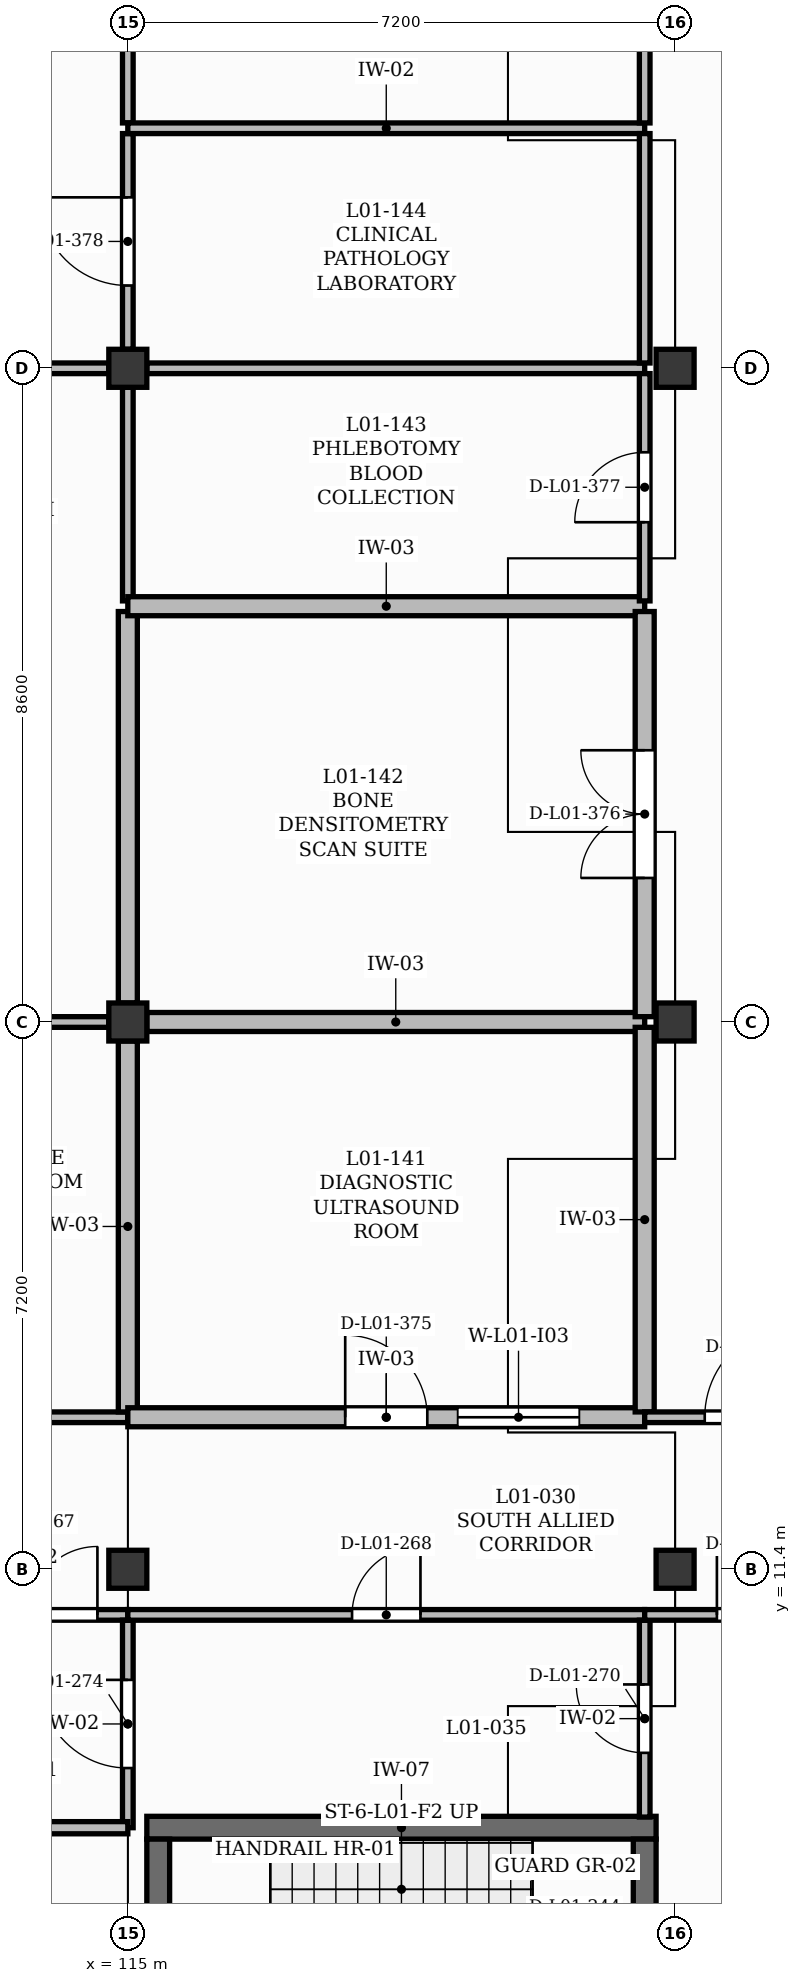
"""IFC4 building model, lengths in metres.
Left out: names, types, materials, properties, quantities, classifications, styles, units other than length and angle.
Written with IfcOpenShell. Run it as: python <this file> out.ifc"""

import sys

from ifc_helpers import new_model, si_unit, direction, frame, frame_2d, origin, origin_2d, place, context, subcontext, project, spatial, rectangle, extrude, element, fill, save


model = new_model("IFC4")
c1 = context("Model", 3, precision=1e-05, world=origin(), true_north=direction((0.0, 1.0)))
c2 = subcontext(c1, "Body", "Model", "MODEL_VIEW")
j1 = project(units=[si_unit("LENGTHUNIT", "METRE"), si_unit("PLANEANGLEUNIT", "RADIAN")], contexts=[c1])
p1 = place(None, origin())
s1 = spatial("IfcSite", under=j1, at=p1, CompositionType="ELEMENT")
p2 = place(p1, origin())
s2 = spatial("IfcBuilding", under=s1, at=p2, CompositionType="ELEMENT")
p3 = place(p2, frame((0.0, 0.0, 4.5)))
s3 = spatial("IfcBuildingStorey", under=s2, at=p3, CompositionType="ELEMENT", Elevation=4.5)
for number, where, z_axis, x_axis in (
    (1, (115.0, 11.4, 0.0), (0.0, 0.0, 1.0), (1.0, 0.0, 0.0)),
    (2, (115.0, 18.6, 0.0), (0.0, 0.0, 1.0), (1.0, 0.0, 0.0)),
    (3, (115.0, 27.2, 0.0), (0.0, 0.0, 1.0), (1.0, 0.0, 0.0)),
    (4, (122.2, 11.4, 0.0), (0.0, 0.0, 1.0), (1.0, 0.0, 0.0)),
    (5, (122.2, 18.6, 0.0), (0.0, 0.0, 1.0), (1.0, 0.0, 0.0)),
    (6, (122.2, 27.2, 0.0), (0.0, 0.0, 1.0), (1.0, 0.0, 0.0)),
):
    element("IfcColumn", number, at=place(p3, frame(where, z_axis=z_axis, x_axis=x_axis)), inside=s3, PredefinedType="COLUMN", context=c2, shape_type="SweptSolid", body=[
        extrude(rectangle(XDim=0.5, YDim=0.5, at=origin_2d()), origin(), (0.0, 0.0, 1.0), 4.22),
    ])
p4 = place(p3, frame((115.25, 8.0, 0.0), z_axis=(0.0, 0.0, 1.0), x_axis=(1.0, 0.0, 0.0)))
e7 = element("IfcWall", 7, at=p4, inside=s3, PredefinedType="SHEAR", context=c2, shape_type="SweptSolid", body=[
    extrude(rectangle(XDim=6.7, YDim=0.3, at=frame_2d((3.35, 0.0))), origin(), (0.0, 0.0, 1.0), 4.25),
])
p5 = place(p3, frame((115.4, 4.95, 0.0), z_axis=(0.0, 0.0, 1.0), x_axis=(0.0, 1.0, 0.0)))
e8 = element("IfcWall", 8, at=p5, inside=s3, PredefinedType="SHEAR", context=c2, shape_type="SweptSolid", body=[
    extrude(rectangle(XDim=2.9, YDim=0.3, at=frame_2d((1.45, 0.0))), origin(), (0.0, 0.0, 1.0), 4.25),
])
p6 = place(p3, frame((121.8, 4.95, 0.0), z_axis=(0.0, 0.0, 1.0), x_axis=(0.0, 1.0, 0.0)))
e9 = element("IfcWall", 9, at=p6, inside=s3, PredefinedType="SHEAR", context=c2, shape_type="SweptSolid", body=[
    extrude(rectangle(XDim=2.9, YDim=0.3, at=frame_2d((1.45, 0.0))), origin(), (0.0, 0.0, 1.0), 4.25),
])
p7 = place(p6, frame((0.89, 0.0, 0.0)))
e10 = element("IfcOpeningElement", 10, at=p7, cuts=e9, PredefinedType="OPENING", context=c2, shape_type="SweptSolid", body=[
    extrude(rectangle(XDim=1.12, YDim=2.1, at=frame_2d((0.56, 1.05))), frame((0.0, 0.16, 0.0), z_axis=(0.0, -1.0, 0.0), x_axis=(1.0, 0.0, 0.0)), (0.0, 0.0, 1.0), 0.32),
])
p8 = place(p3, frame((110.6, 13.4, 0.0), z_axis=(0.0, 0.0, 1.0), x_axis=(1.0, 0.0, 0.0)))
e11 = element("IfcWall", 11, at=p8, inside=s3, PredefinedType="PARTITIONING", context=c2, shape_type="SweptSolid", body=[
    extrude(rectangle(XDim=4.4, YDim=0.14, at=frame_2d((2.2, 0.0))), origin(), (0.0, 0.0, 1.0), 4.18),
])
p9 = place(p3, frame((110.6, 18.6, 0.0), z_axis=(0.0, 0.0, 1.0), x_axis=(1.0, 0.0, 0.0)))
e12 = element("IfcWall", 12, at=p9, inside=s3, PredefinedType="PARTITIONING", context=c2, shape_type="SweptSolid", body=[
    extrude(rectangle(XDim=4.15, YDim=0.14, at=frame_2d((2.075, 0.0))), origin(), (0.0, 0.0, 1.0), 3.76),
])
p10 = place(p3, frame((110.6, 27.2, 0.0), z_axis=(0.0, 0.0, 1.0), x_axis=(1.0, 0.0, 0.0)))
e13 = element("IfcWall", 13, at=p10, inside=s3, PredefinedType="PARTITIONING", context=c2, shape_type="SweptSolid", body=[
    extrude(rectangle(XDim=4.15, YDim=0.14, at=frame_2d((2.075, 0.0))), origin(), (0.0, 0.0, 1.0), 3.87),
])
p11 = place(p3, frame((112.4, 10.8, 0.0), z_axis=(0.0, 0.0, 1.0), x_axis=(1.0, 0.0, 0.0)))
e14 = element("IfcWall", 14, at=p11, inside=s3, PredefinedType="PARTITIONING", context=c2, shape_type="SweptSolid", body=[
    extrude(rectangle(XDim=2.6, YDim=0.14, at=frame_2d((1.3, 0.0))), origin(), (0.0, 0.0, 1.0), 4.18),
])
p12 = place(p11, frame((0.4, 0.0, 0.0)))
e15 = element("IfcOpeningElement", 15, at=p12, cuts=e14, PredefinedType="OPENING", context=c2, shape_type="SweptSolid", body=[
    extrude(rectangle(XDim=1.8, YDim=2.3, at=frame_2d((0.9, 1.15))), frame((0.0, 0.08, 0.0), z_axis=(0.0, -1.0, 0.0), x_axis=(1.0, 0.0, 0.0)), (0.0, 0.0, 1.0), 0.16),
])
p13 = place(p3, frame((115.0, 8.0, 0.0), z_axis=(0.0, 0.0, 1.0), x_axis=(0.0, 1.0, 0.0)))
e16 = element("IfcWall", 16, at=p13, inside=s3, PredefinedType="PARTITIONING", context=c2, shape_type="SweptSolid", body=[
    extrude(rectangle(XDim=2.73, YDim=0.14, at=frame_2d((1.365, 0.0))), origin(), (0.0, 0.0, 1.0), 3.52),
])
p14 = place(p13, frame((0.785, 0.0, 0.0)))
e17 = element("IfcOpeningElement", 17, at=p14, cuts=e16, PredefinedType="OPENING", context=c2, shape_type="SweptSolid", body=[
    extrude(rectangle(XDim=1.16, YDim=2.1, at=frame_2d((0.58, 1.05))), frame((0.0, 0.08, 0.0), z_axis=(0.0, -1.0, 0.0), x_axis=(1.0, 0.0, 0.0)), (0.0, 0.0, 1.0), 0.16),
])
p15 = place(p3, frame((115.0, 10.8, 0.0), z_axis=(0.0, 0.0, 1.0), x_axis=(1.0, 0.0, 0.0)))
e18 = element("IfcWall", 18, at=p15, inside=s3, PredefinedType="PARTITIONING", context=c2, shape_type="SweptSolid", body=[
    extrude(rectangle(XDim=6.8, YDim=0.14, at=frame_2d((3.4, 0.0))), origin(), (0.0, 0.0, 1.0), 4.18),
])
p16 = place(p15, frame((2.95, 0.0, 0.0)))
e19 = element("IfcOpeningElement", 19, at=p16, cuts=e18, PredefinedType="OPENING", context=c2, shape_type="SweptSolid", body=[
    extrude(rectangle(XDim=0.9, YDim=2.1, at=frame_2d((0.45, 1.05))), frame((0.0, 0.08, 0.0), z_axis=(0.0, -1.0, 0.0), x_axis=(1.0, 0.0, 0.0)), (0.0, 0.0, 1.0), 0.16),
])
p17 = place(p3, frame((115.0, 13.47, 0.0), z_axis=(0.0, 0.0, 1.0), x_axis=(0.0, 1.0, 0.0)))
e20 = element("IfcWall", 20, at=p17, inside=s3, PredefinedType="SOLIDWALL", context=c2, shape_type="SweptSolid", body=[
    extrude(rectangle(XDim=4.88, YDim=0.25, at=frame_2d((2.44, 0.0))), origin(), (0.0, 0.0, 1.0), 3.52),
])
p18 = place(p3, frame((115.0, 13.4, 0.0), z_axis=(0.0, 0.0, 1.0), x_axis=(1.0, 0.0, 0.0)))
e21 = element("IfcWall", 21, at=p18, inside=s3, PredefinedType="SOLIDWALL", context=c2, shape_type="SweptSolid", body=[
    extrude(rectangle(XDim=6.8, YDim=0.25, at=frame_2d((3.4, 0.0))), origin(), (0.0, 0.0, 1.0), 4.18),
])
p19 = place(p18, frame((2.86, 0.0, 0.0)))
e22 = element("IfcOpeningElement", 22, at=p19, cuts=e21, PredefinedType="OPENING", context=c2, shape_type="SweptSolid", body=[
    extrude(rectangle(XDim=1.08, YDim=2.15, at=frame_2d((0.54, 1.075))), frame((0.0, 0.135, 0.0), z_axis=(0.0, -1.0, 0.0), x_axis=(1.0, 0.0, 0.0)), (0.0, 0.0, 1.0), 0.27),
])
p20 = place(p18, frame((4.34, 0.0, 1.05)))
e23 = element("IfcOpeningElement", 23, at=p20, cuts=e21, PredefinedType="OPENING", context=c2, shape_type="SweptSolid", body=[
    extrude(rectangle(XDim=1.6, YDim=1.1, at=frame_2d((0.8, 0.55))), frame((0.0, 0.135, 0.0), z_axis=(0.0, -1.0, 0.0), x_axis=(1.0, 0.0, 0.0)), (0.0, 0.0, 1.0), 0.27),
])
p21 = place(p3, frame((115.0, 18.85, 0.0), z_axis=(0.0, 0.0, 1.0), x_axis=(0.0, 1.0, 0.0)))
e24 = element("IfcWall", 24, at=p21, inside=s3, PredefinedType="SOLIDWALL", context=c2, shape_type="SweptSolid", body=[
    extrude(rectangle(XDim=5.15, YDim=0.25, at=frame_2d((2.575, 0.0))), origin(), (0.0, 0.0, 1.0), 3.52),
])
p22 = place(p3, frame((115.25, 18.6, 0.0), z_axis=(0.0, 0.0, 1.0), x_axis=(1.0, 0.0, 0.0)))
e25 = element("IfcWall", 25, at=p22, inside=s3, PredefinedType="SOLIDWALL", context=c2, shape_type="SweptSolid", body=[
    extrude(rectangle(XDim=6.55, YDim=0.25, at=frame_2d((3.275, 0.0))), origin(), (0.0, 0.0, 1.0), 3.52),
])
p23 = place(p3, frame((115.0, 24.14, 0.0), z_axis=(0.0, 0.0, 1.0), x_axis=(0.0, 1.0, 0.0)))
e26 = element("IfcWall", 26, at=p23, inside=s3, PredefinedType="PARTITIONING", context=c2, shape_type="SweptSolid", body=[
    extrude(rectangle(XDim=2.81, YDim=0.14, at=frame_2d((1.405, 0.0))), origin(), (0.0, 0.0, 1.0), 3.52),
])
p24 = place(p3, frame((115.0, 24.07, 0.0), z_axis=(0.0, 0.0, 1.0), x_axis=(1.0, 0.0, 0.0)))
e27 = element("IfcWall", 27, at=p24, inside=s3, PredefinedType="SOLIDWALL", context=c2, shape_type="SweptSolid", body=[
    extrude(rectangle(XDim=6.8, YDim=0.25, at=frame_2d((3.4, 0.0))), origin(), (0.0, 0.0, 1.0), 4.18),
])
p25 = place(p3, frame((115.0, 27.45, 0.0), z_axis=(0.0, 0.0, 1.0), x_axis=(0.0, 1.0, 0.0)))
e28 = element("IfcWall", 28, at=p25, inside=s3, PredefinedType="PARTITIONING", context=c2, shape_type="SweptSolid", body=[
    extrude(rectangle(XDim=2.838, YDim=0.14, at=frame_2d((1.419, 0.0))), origin(), (0.0, 0.0, 1.0), 3.52),
])
p26 = place(p25, frame((0.839, 0.0, 0.0)))
e29 = element("IfcOpeningElement", 29, at=p26, cuts=e28, PredefinedType="OPENING", context=c2, shape_type="SweptSolid", body=[
    extrude(rectangle(XDim=1.16, YDim=2.1, at=frame_2d((0.58, 1.05))), frame((0.0, 0.08, 0.0), z_axis=(0.0, -1.0, 0.0), x_axis=(1.0, 0.0, 0.0)), (0.0, 0.0, 1.0), 0.16),
])
p27 = place(p3, frame((115.25, 27.2, 0.0), z_axis=(0.0, 0.0, 1.0), x_axis=(1.0, 0.0, 0.0)))
e30 = element("IfcWall", 30, at=p27, inside=s3, PredefinedType="PARTITIONING", context=c2, shape_type="SweptSolid", body=[
    extrude(rectangle(XDim=6.55, YDim=0.14, at=frame_2d((3.275, 0.0))), origin(), (0.0, 0.0, 1.0), 3.52),
])
p28 = place(p3, frame((115.0, 30.428, 0.0), z_axis=(0.0, 0.0, 1.0), x_axis=(0.0, 1.0, 0.0)))
e31 = element("IfcWall", 31, at=p28, inside=s3, PredefinedType="PARTITIONING", context=c2, shape_type="SweptSolid", body=[
    extrude(rectangle(XDim=6.122, YDim=0.14, at=frame_2d((3.061, 0.0))), origin(), (0.0, 0.0, 1.0), 3.52),
])
p29 = place(p28, frame((2.161, 0.0, 0.0)))
e32 = element("IfcOpeningElement", 32, at=p29, cuts=e31, PredefinedType="OPENING", context=c2, shape_type="SweptSolid", body=[
    extrude(rectangle(XDim=1.8, YDim=2.3, at=frame_2d((0.9, 1.15))), frame((0.0, 0.08, 0.0), z_axis=(0.0, -1.0, 0.0), x_axis=(1.0, 0.0, 0.0)), (0.0, 0.0, 1.0), 0.16),
])
p30 = place(p3, frame((115.0, 30.358, 0.0), z_axis=(0.0, 0.0, 1.0), x_axis=(1.0, 0.0, 0.0)))
e33 = element("IfcWall", 33, at=p30, inside=s3, PredefinedType="PARTITIONING", context=c2, shape_type="SweptSolid", body=[
    extrude(rectangle(XDim=6.8, YDim=0.14, at=frame_2d((3.4, 0.0))), origin(), (0.0, 0.0, 1.0), 4.18),
])
p31 = place(p3, frame((121.8, 8.14, 0.0), z_axis=(0.0, 0.0, 1.0), x_axis=(0.0, 1.0, 0.0)))
e34 = element("IfcWall", 34, at=p31, inside=s3, PredefinedType="PARTITIONING", context=c2, shape_type="SweptSolid", body=[
    extrude(rectangle(XDim=2.59, YDim=0.14, at=frame_2d((1.295, 0.0))), origin(), (0.0, 0.0, 1.0), 4.18),
])
p32 = place(p31, frame((0.845, 0.0, 0.0)))
e35 = element("IfcOpeningElement", 35, at=p32, cuts=e34, PredefinedType="OPENING", context=c2, shape_type="SweptSolid", body=[
    extrude(rectangle(XDim=0.9, YDim=2.1, at=frame_2d((0.45, 1.05))), frame((0.0, 0.08, 0.0), z_axis=(0.0, -1.0, 0.0), x_axis=(1.0, 0.0, 0.0)), (0.0, 0.0, 1.0), 0.16),
])
p33 = place(p3, frame((121.8, 10.8, 0.0), z_axis=(0.0, 0.0, 1.0), x_axis=(1.0, 0.0, 0.0)))
e36 = element("IfcWall", 36, at=p33, inside=s3, PredefinedType="PARTITIONING", context=c2, shape_type="SweptSolid", body=[
    extrude(rectangle(XDim=2.8, YDim=0.14, at=frame_2d((1.4, 0.0))), origin(), (0.0, 0.0, 1.0), 4.18),
])
p34 = place(p33, frame((0.95, 0.0, 0.0)))
e37 = element("IfcOpeningElement", 37, at=p34, cuts=e36, PredefinedType="OPENING", context=c2, shape_type="SweptSolid", body=[
    extrude(rectangle(XDim=0.9, YDim=2.1, at=frame_2d((0.45, 1.05))), frame((0.0, 0.08, 0.0), z_axis=(0.0, -1.0, 0.0), x_axis=(1.0, 0.0, 0.0)), (0.0, 0.0, 1.0), 0.16),
])
p35 = place(p3, frame((121.8, 13.47, 0.0), z_axis=(0.0, 0.0, 1.0), x_axis=(0.0, 1.0, 0.0)))
e38 = element("IfcWall", 38, at=p35, inside=s3, PredefinedType="SOLIDWALL", context=c2, shape_type="SweptSolid", body=[
    extrude(rectangle(XDim=5.06, YDim=0.25, at=frame_2d((2.53, 0.0))), origin(), (0.0, 0.0, 1.0), 4.18),
])
p36 = place(p3, frame((121.8, 13.4, 0.0), z_axis=(0.0, 0.0, 1.0), x_axis=(1.0, 0.0, 0.0)))
e39 = element("IfcWall", 39, at=p36, inside=s3, PredefinedType="PARTITIONING", context=c2, shape_type="SweptSolid", body=[
    extrude(rectangle(XDim=2.8, YDim=0.14, at=frame_2d((1.4, 0.0))), origin(), (0.0, 0.0, 1.0), 4.18),
])
p37 = place(p36, frame((0.79, 0.0, 0.0)))
e40 = element("IfcOpeningElement", 40, at=p37, cuts=e39, PredefinedType="OPENING", context=c2, shape_type="SweptSolid", body=[
    extrude(rectangle(XDim=1.22, YDim=2.1, at=frame_2d((0.61, 1.05))), frame((0.0, 0.08, 0.0), z_axis=(0.0, -1.0, 0.0), x_axis=(1.0, 0.0, 0.0)), (0.0, 0.0, 1.0), 0.16),
])
p38 = place(p3, frame((121.8, 18.67, 0.0), z_axis=(0.0, 0.0, 1.0), x_axis=(0.0, 1.0, 0.0)))
e41 = element("IfcWall", 41, at=p38, inside=s3, PredefinedType="SOLIDWALL", context=c2, shape_type="SweptSolid", body=[
    extrude(rectangle(XDim=5.33, YDim=0.25, at=frame_2d((2.665, 0.0))), origin(), (0.0, 0.0, 1.0), 4.18),
])
p39 = place(p38, frame((1.825, 0.0, 0.0)))
e42 = element("IfcOpeningElement", 42, at=p39, cuts=e41, PredefinedType="OPENING", context=c2, shape_type="SweptSolid", body=[
    extrude(rectangle(XDim=1.68, YDim=2.3, at=frame_2d((0.84, 1.15))), frame((0.0, 0.135, 0.0), z_axis=(0.0, -1.0, 0.0), x_axis=(1.0, 0.0, 0.0)), (0.0, 0.0, 1.0), 0.27),
])
p40 = place(p3, frame((121.8, 24.14, 0.0), z_axis=(0.0, 0.0, 1.0), x_axis=(0.0, 1.0, 0.0)))
e43 = element("IfcWall", 43, at=p40, inside=s3, PredefinedType="PARTITIONING", context=c2, shape_type="SweptSolid", body=[
    extrude(rectangle(XDim=2.99, YDim=0.14, at=frame_2d((1.495, 0.0))), origin(), (0.0, 0.0, 1.0), 4.18),
])
p41 = place(p40, frame((1.035, 0.0, 0.0)))
e44 = element("IfcOpeningElement", 44, at=p41, cuts=e43, PredefinedType="OPENING", context=c2, shape_type="SweptSolid", body=[
    extrude(rectangle(XDim=0.92, YDim=2.1, at=frame_2d((0.46, 1.05))), frame((0.0, 0.08, 0.0), z_axis=(0.0, -1.0, 0.0), x_axis=(1.0, 0.0, 0.0)), (0.0, 0.0, 1.0), 0.16),
])
p42 = place(p3, frame((121.8, 27.27, 0.0), z_axis=(0.0, 0.0, 1.0), x_axis=(0.0, 1.0, 0.0)))
e45 = element("IfcWall", 45, at=p42, inside=s3, PredefinedType="PARTITIONING", context=c2, shape_type="SweptSolid", body=[
    extrude(rectangle(XDim=3.018, YDim=0.14, at=frame_2d((1.509, 0.0))), origin(), (0.0, 0.0, 1.0), 4.18),
])
p43 = place(p3, frame((121.8, 30.428, 0.0), z_axis=(0.0, 0.0, 1.0), x_axis=(0.0, 1.0, 0.0)))
e46 = element("IfcWall", 46, at=p43, inside=s3, PredefinedType="PARTITIONING", context=c2, shape_type="SweptSolid", body=[
    extrude(rectangle(XDim=6.302, YDim=0.14, at=frame_2d((3.151, 0.0))), origin(), (0.0, 0.0, 1.0), 4.18),
])
p44 = place(p3, frame((112.4, 8.0, 0.0), z_axis=(0.0, 0.0, 1.0), x_axis=(1.0, 0.0, 0.0)))
e47 = element("IfcWall", 47, at=p44, inside=s3, PredefinedType="PARTITIONING", context=c2, shape_type="SweptSolid", body=[
    extrude(rectangle(XDim=2.6, YDim=0.16, at=frame_2d((1.3, 0.0))), origin(), (0.0, 0.0, 1.0), 4.18),
])
p45 = place(p34, origin())
e48 = element("IfcDoor", 48, at=p45, inside=s3, OperationType="SINGLE_SWING_LEFT", PredefinedType="DOOR", context=c2, shape_type="SweptSolid", body=[
    extrude(rectangle(XDim=0.9, YDim=2.1, at=frame_2d((0.45, 1.05))), frame((0.0, 0.025, 0.0), z_axis=(0.0, -1.0, 0.0), x_axis=(1.0, 0.0, 0.0)), (0.0, 0.0, 1.0), 0.05),
])
fill(e37, e48)
p46 = place(p37, origin())
e49 = element("IfcDoor", 49, at=p46, inside=s3, OperationType="SINGLE_SWING_RIGHT", PredefinedType="DOOR", context=c2, shape_type="SweptSolid", body=[
    extrude(rectangle(XDim=1.22, YDim=2.1, at=frame_2d((0.61, 1.05))), frame((0.0, 0.025, 0.0), z_axis=(0.0, -1.0, 0.0), x_axis=(1.0, 0.0, 0.0)), (0.0, 0.0, 1.0), 0.05),
])
fill(e40, e49)
p47 = place(p12, origin())
e50 = element("IfcDoor", 50, at=p47, inside=s3, OperationType="DOUBLE_DOOR_SINGLE_SWING", PredefinedType="DOOR", context=c2, shape_type="SweptSolid", body=[
    extrude(rectangle(XDim=1.8, YDim=2.3, at=frame_2d((0.9, 1.15))), frame((0.0, 0.025, 0.0), z_axis=(0.0, -1.0, 0.0), x_axis=(1.0, 0.0, 0.0)), (0.0, 0.0, 1.0), 0.05),
])
fill(e15, e50)
p48 = place(p16, origin())
e51 = element("IfcDoor", 51, at=p48, inside=s3, OperationType="SINGLE_SWING_RIGHT", PredefinedType="DOOR", context=c2, shape_type="SweptSolid", body=[
    extrude(rectangle(XDim=0.9, YDim=2.1, at=frame_2d((0.45, 1.05))), frame((0.0, 0.025, 0.0), z_axis=(0.0, -1.0, 0.0), x_axis=(1.0, 0.0, 0.0)), (0.0, 0.0, 1.0), 0.05),
])
fill(e19, e51)
p49 = place(p32, origin())
e52 = element("IfcDoor", 52, at=p49, inside=s3, OperationType="SINGLE_SWING_RIGHT", PredefinedType="DOOR", context=c2, shape_type="SweptSolid", body=[
    extrude(rectangle(XDim=0.9, YDim=2.1, at=frame_2d((0.45, 1.05))), frame((0.0, 0.025, 0.0), z_axis=(0.0, -1.0, 0.0), x_axis=(1.0, 0.0, 0.0)), (0.0, 0.0, 1.0), 0.05),
])
fill(e35, e52)
p50 = place(p14, origin())
e53 = element("IfcDoor", 53, at=p50, inside=s3, OperationType="SINGLE_SWING_RIGHT", PredefinedType="DOOR", context=c2, shape_type="SweptSolid", body=[
    extrude(rectangle(XDim=1.16, YDim=2.1, at=frame_2d((0.58, 1.05))), frame((0.0, 0.025, 0.0), z_axis=(0.0, -1.0, 0.0), x_axis=(1.0, 0.0, 0.0)), (0.0, 0.0, 1.0), 0.05),
])
fill(e17, e53)
p51 = place(p19, origin())
e54 = element("IfcDoor", 54, at=p51, inside=s3, OperationType="SINGLE_SWING_LEFT", PredefinedType="DOOR", context=c2, shape_type="SweptSolid", body=[
    extrude(rectangle(XDim=1.08, YDim=2.15, at=frame_2d((0.54, 1.075))), frame((0.0, 0.025, 0.0), z_axis=(0.0, -1.0, 0.0), x_axis=(1.0, 0.0, 0.0)), (0.0, 0.0, 1.0), 0.05),
])
fill(e22, e54)
p52 = place(p20, origin())
e55 = element("IfcWindow", 55, at=p52, inside=s3, PartitioningType="SINGLE_PANEL", PredefinedType="WINDOW", context=c2, shape_type="SweptSolid", body=[
    extrude(rectangle(XDim=1.6, YDim=1.1, at=frame_2d((0.8, 0.55))), frame((0.0, 0.03, 0.0), z_axis=(0.0, -1.0, 0.0), x_axis=(1.0, 0.0, 0.0)), (0.0, 0.0, 1.0), 0.06),
])
fill(e23, e55)
p53 = place(p39, origin())
e56 = element("IfcDoor", 56, at=p53, inside=s3, OperationType="DOUBLE_DOOR_SINGLE_SWING", PredefinedType="DOOR", context=c2, shape_type="SweptSolid", body=[
    extrude(rectangle(XDim=1.68, YDim=2.3, at=frame_2d((0.84, 1.15))), frame((0.0, 0.025, 0.0), z_axis=(0.0, -1.0, 0.0), x_axis=(1.0, 0.0, 0.0)), (0.0, 0.0, 1.0), 0.05),
])
fill(e42, e56)
p54 = place(p41, origin())
e57 = element("IfcDoor", 57, at=p54, inside=s3, OperationType="SINGLE_SWING_LEFT", PredefinedType="DOOR", context=c2, shape_type="SweptSolid", body=[
    extrude(rectangle(XDim=0.92, YDim=2.1, at=frame_2d((0.46, 1.05))), frame((0.0, 0.025, 0.0), z_axis=(0.0, -1.0, 0.0), x_axis=(1.0, 0.0, 0.0)), (0.0, 0.0, 1.0), 0.05),
])
fill(e44, e57)
p55 = place(p26, origin())
e58 = element("IfcDoor", 58, at=p55, inside=s3, OperationType="SINGLE_SWING_RIGHT", PredefinedType="DOOR", context=c2, shape_type="SweptSolid", body=[
    extrude(rectangle(XDim=1.16, YDim=2.1, at=frame_2d((0.58, 1.05))), frame((0.0, 0.025, 0.0), z_axis=(0.0, -1.0, 0.0), x_axis=(1.0, 0.0, 0.0)), (0.0, 0.0, 1.0), 0.05),
])
fill(e29, e58)
save(model, sys.argv[1])
